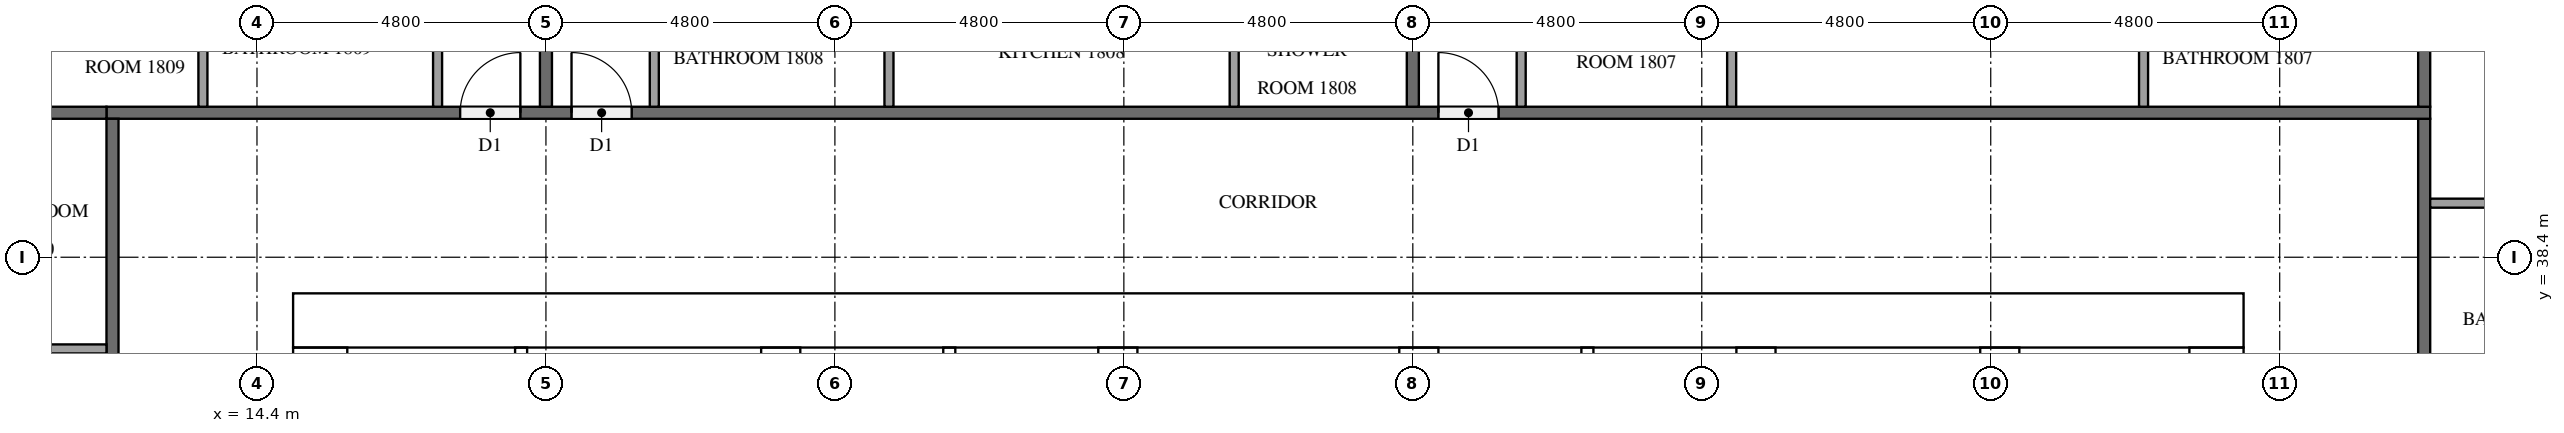
"""IFC4 building model, lengths in metres.
Left out: names, types, materials, properties, quantities, classifications, styles, units other than length and angle.
Written with IfcOpenShell. Run it as: python <this file> out.ifc"""

import sys

from ifc_helpers import new_model, si_unit, direction, frame, frame_2d, origin, place, context, subcontext, project, spatial, rectangle, extrude, element, fill, save


model = new_model("IFC4")
c1 = context("Model", 3, precision=1e-05, world=origin(), true_north=direction((0.0, 1.0)))
c2 = subcontext(c1, "Body", "Model", "MODEL_VIEW")
j1 = project(units=[si_unit("LENGTHUNIT", "METRE"), si_unit("PLANEANGLEUNIT", "RADIAN")], contexts=[c1])
p1 = place(None, origin())
s1 = spatial("IfcSite", under=j1, at=p1, CompositionType="ELEMENT")
p2 = place(p1, origin())
s2 = spatial("IfcBuilding", under=s1, at=p2, CompositionType="ELEMENT")
p3 = place(p2, frame((0.0, 0.0, 73.3)))
s3 = spatial("IfcBuildingStorey", under=s2, at=p3, CompositionType="ELEMENT", Elevation=73.3)
p4 = place(p3, frame((15.0, 37.35, 0.0), z_axis=(0.0, 0.0, 1.0), x_axis=(1.0, 0.0, 0.0)))
e1 = element("IfcWall", 1, at=p4, inside=s3, PredefinedType="SHEAR", context=c2, shape_type="SweptSolid", body=[
    extrude(rectangle(XDim=32.4, YDim=0.9, at=frame_2d((16.2, 0.0))), origin(), (0.0, 0.0, 1.0), 3.2),
])
p5 = place(p4, frame((15.3, 0.0, 0.0)))
e2 = element("IfcOpeningElement", 2, at=p5, cuts=e1, PredefinedType="OPENING", context=c2, shape_type="SweptSolid", body=[
    extrude(rectangle(XDim=1.8, YDim=2.1, at=frame_2d((0.9, 1.05))), frame((0.0, 0.46, 0.0), z_axis=(0.0, -1.0, 0.0), x_axis=(1.0, 0.0, 0.0)), (0.0, 0.0, 1.0), 0.92),
])
p6 = place(p4, frame((1.794, 0.0, 0.0)))
e3 = element("IfcOpeningElement", 3, at=p6, cuts=e1, PredefinedType="OPENING", context=c2, shape_type="SweptSolid", body=[
    extrude(rectangle(XDim=1.0, YDim=2.1, at=frame_2d((0.5, 1.05))), frame((0.0, 0.46, 0.0), z_axis=(0.0, -1.0, 0.0), x_axis=(1.0, 0.0, 0.0)), (0.0, 0.0, 1.0), 0.92),
])
p7 = place(p4, frame((5.331, 0.0, 0.0)))
e4 = element("IfcOpeningElement", 4, at=p7, cuts=e1, PredefinedType="OPENING", context=c2, shape_type="SweptSolid", body=[
    extrude(rectangle(XDim=1.0, YDim=2.1, at=frame_2d((0.5, 1.05))), frame((0.0, 0.46, 0.0), z_axis=(0.0, -1.0, 0.0), x_axis=(1.0, 0.0, 0.0)), (0.0, 0.0, 1.0), 0.92),
])
p8 = place(p3, frame((15.45, 15.9, 0.0), z_axis=(0.0, 0.0, 1.0), x_axis=(0.0, 1.0, 0.0)))
e5 = element("IfcWall", 5, at=p8, inside=s3, PredefinedType="SHEAR", context=c2, shape_type="SweptSolid", body=[
    extrude(rectangle(XDim=21.0, YDim=0.9, at=frame_2d((10.5, 0.0))), origin(), (0.0, 0.0, 1.0), 3.2),
])
p9 = place(p8, frame((4.86, 0.0, 0.0)))
e6 = element("IfcOpeningElement", 6, at=p9, cuts=e5, PredefinedType="OPENING", context=c2, shape_type="SweptSolid", body=[
    extrude(rectangle(XDim=1.2, YDim=2.1, at=frame_2d((0.6, 1.05))), frame((0.0, 0.46, 0.0), z_axis=(0.0, -1.0, 0.0), x_axis=(1.0, 0.0, 0.0)), (0.0, 0.0, 1.0), 0.92),
])
p10 = place(p3, frame((46.95, 15.9, 0.0), z_axis=(0.0, 0.0, 1.0), x_axis=(0.0, 1.0, 0.0)))
e7 = element("IfcWall", 7, at=p10, inside=s3, PredefinedType="SHEAR", context=c2, shape_type="SweptSolid", body=[
    extrude(rectangle(XDim=21.0, YDim=0.9, at=frame_2d((10.5, 0.0))), origin(), (0.0, 0.0, 1.0), 3.2),
])
p11 = place(p10, frame((10.2, 0.0, 0.0)))
e8 = element("IfcOpeningElement", 8, at=p11, cuts=e7, PredefinedType="OPENING", context=c2, shape_type="SweptSolid", body=[
    extrude(rectangle(XDim=1.2, YDim=2.1, at=frame_2d((0.6, 1.05))), frame((0.0, 0.46, 0.0), z_axis=(0.0, -1.0, 0.0), x_axis=(1.0, 0.0, 0.0)), (0.0, 0.0, 1.0), 0.92),
])
p12 = place(p3, frame((23.1, 15.9, 0.0), z_axis=(0.0, 0.0, 1.0), x_axis=(0.0, 1.0, 0.0)))
e9 = element("IfcWall", 9, at=p12, inside=s3, PredefinedType="SHEAR", context=c2, shape_type="SweptSolid", body=[
    extrude(rectangle(XDim=21.0, YDim=0.65, at=frame_2d((10.5, 0.0))), origin(), (0.0, 0.0, 1.0), 3.2),
])
p13 = place(p3, frame((39.3, 27.75, 0.0), z_axis=(0.0, 0.0, 1.0), x_axis=(0.0, 1.0, 0.0)))
e10 = element("IfcWall", 10, at=p13, inside=s3, PredefinedType="SHEAR", context=c2, shape_type="SweptSolid", body=[
    extrude(rectangle(XDim=9.15, YDim=0.65, at=frame_2d((4.575, 0.0))), origin(), (0.0, 0.0, 1.0), 3.2),
])
p14 = place(p3, frame((43.35, 27.75, 0.0), z_axis=(0.0, 0.0, 1.0), x_axis=(0.0, 1.0, 0.0)))
e11 = element("IfcWall", 11, at=p14, inside=s3, PredefinedType="SHEAR", context=c2, shape_type="SweptSolid", body=[
    extrude(rectangle(XDim=9.15, YDim=0.65, at=frame_2d((4.575, 0.0))), origin(), (0.0, 0.0, 1.0), 3.2),
])
p15 = place(p14, frame((7.65, 0.0, 0.0)))
e12 = element("IfcOpeningElement", 12, at=p15, cuts=e11, PredefinedType="OPENING", context=c2, shape_type="SweptSolid", body=[
    extrude(rectangle(XDim=1.2, YDim=2.1, at=frame_2d((0.6, 1.05))), frame((0.0, 0.335, 0.0), z_axis=(0.0, -1.0, 0.0), x_axis=(1.0, 0.0, 0.0)), (0.0, 0.0, 1.0), 0.67),
])
for number, where, z_axis, x_axis in (
    (13, (28.7, 33.875, 0.0), (0.0, 0.0, 1.0), (0.0, 1.0, 0.0)),
    (14, (33.7, 33.875, 0.0), (0.0, 0.0, 1.0), (0.0, 1.0, 0.0)),
):
    element("IfcWall", number, at=place(p3, frame(where, z_axis=z_axis, x_axis=x_axis)), inside=s3, PredefinedType="SHEAR", context=c2, shape_type="SweptSolid", body=[
        extrude(rectangle(XDim=3.025, YDim=0.65, at=frame_2d((1.512, 0.0))), origin(), (0.0, 0.0, 1.0), 3.2),
    ])
for number, where, z_axis, x_axis in (
    (15, (25.9, 33.875, 0.0), (0.0, 0.0, 1.0), (0.0, 1.0, 0.0)),
    (16, (36.5, 33.875, 0.0), (0.0, 0.0, 1.0), (0.0, 1.0, 0.0)),
):
    element("IfcWall", number, at=place(p3, frame(where, z_axis=z_axis, x_axis=x_axis)), inside=s3, PredefinedType="SOLIDWALL", context=c2, shape_type="SweptSolid", body=[
        extrude(rectangle(XDim=3.025, YDim=0.2, at=frame_2d((1.512, 0.0))), origin(), (0.0, 0.0, 1.0), 3.2),
    ])
p16 = place(p3, frame((18.788, 31.575, 0.0), z_axis=(0.0, 0.0, 1.0), x_axis=(0.0, 1.0, 0.0)))
e17 = element("IfcWall", 17, at=p16, inside=s3, PredefinedType="PARTITIONING", context=c2, shape_type="SweptSolid", body=[
    extrude(rectangle(XDim=5.325, YDim=0.2, at=frame_2d((2.663, 0.0))), origin(), (0.0, 0.0, 1.0), 3.2),
])
p17 = place(p3, frame((50.4, 40.7, 0.0), z_axis=(0.0, 0.0, 1.0), x_axis=(0.0, -1.0, 0.0)))
e18 = element("IfcWall", 18, at=p17, inside=s3, PredefinedType="PARTITIONING", context=c2, shape_type="SweptSolid", body=[
    extrude(rectangle(XDim=28.6, YDim=0.2, at=frame_2d((14.3, 0.0))), origin(), (0.0, 0.0, 1.0), 3.2),
])
p18 = place(p17, frame((21.875, 0.0, 0.0)))
e19 = element("IfcOpeningElement", 19, at=p18, cuts=e18, PredefinedType="OPENING", context=c2, shape_type="SweptSolid", body=[
    extrude(rectangle(XDim=1.1, YDim=2.1, at=frame_2d((0.55, 1.05))), frame((0.0, 0.11, 0.0), z_axis=(0.0, -1.0, 0.0), x_axis=(1.0, 0.0, 0.0)), (0.0, 0.0, 1.0), 0.22),
])
p19 = place(p17, frame((20.075, 0.0, 0.0)))
e20 = element("IfcOpeningElement", 20, at=p19, cuts=e18, PredefinedType="OPENING", context=c2, shape_type="SweptSolid", body=[
    extrude(rectangle(XDim=1.0, YDim=2.1, at=frame_2d((0.5, 1.05))), frame((0.0, 0.11, 0.0), z_axis=(0.0, -1.0, 0.0), x_axis=(1.0, 0.0, 0.0)), (0.0, 0.0, 1.0), 0.22),
])
p20 = place(p17, frame((5.675, 0.0, 0.0)))
e21 = element("IfcOpeningElement", 21, at=p20, cuts=e18, PredefinedType="OPENING", context=c2, shape_type="SweptSolid", body=[
    extrude(rectangle(XDim=1.0, YDim=2.1, at=frame_2d((0.5, 1.05))), frame((0.0, 0.11, 0.0), z_axis=(0.0, -1.0, 0.0), x_axis=(1.0, 0.0, 0.0)), (0.0, 0.0, 1.0), 0.22),
])
p21 = place(p3, frame((11.9, 40.8, 0.0), z_axis=(0.0, 0.0, 1.0), x_axis=(1.0, 0.0, 0.0)))
e22 = element("IfcWall", 22, at=p21, inside=s3, PredefinedType="PARTITIONING", context=c2, shape_type="SweptSolid", body=[
    extrude(rectangle(XDim=38.6, YDim=0.2, at=frame_2d((19.3, 0.0))), origin(), (0.0, 0.0, 1.0), 3.2),
])
p22 = place(p21, frame((22.125, 0.0, 0.0)))
e23 = element("IfcOpeningElement", 23, at=p22, cuts=e22, PredefinedType="OPENING", context=c2, shape_type="SweptSolid", body=[
    extrude(rectangle(XDim=1.0, YDim=2.1, at=frame_2d((0.5, 1.05))), frame((0.0, 0.11, 0.0), z_axis=(0.0, -1.0, 0.0), x_axis=(1.0, 0.0, 0.0)), (0.0, 0.0, 1.0), 0.22),
])
p23 = place(p21, frame((7.725, 0.0, 0.0)))
e24 = element("IfcOpeningElement", 24, at=p23, cuts=e22, PredefinedType="OPENING", context=c2, shape_type="SweptSolid", body=[
    extrude(rectangle(XDim=1.0, YDim=2.1, at=frame_2d((0.5, 1.05))), frame((0.0, 0.11, 0.0), z_axis=(0.0, -1.0, 0.0), x_axis=(1.0, 0.0, 0.0)), (0.0, 0.0, 1.0), 0.22),
])
p24 = place(p21, frame((5.875, 0.0, 0.0)))
e25 = element("IfcOpeningElement", 25, at=p24, cuts=e22, PredefinedType="OPENING", context=c2, shape_type="SweptSolid", body=[
    extrude(rectangle(XDim=1.0, YDim=2.1, at=frame_2d((0.5, 1.05))), frame((0.0, 0.11, 0.0), z_axis=(0.0, -1.0, 0.0), x_axis=(1.0, 0.0, 0.0)), (0.0, 0.0, 1.0), 0.22),
])
p25 = place(p3, frame((12.0, 12.1, 0.0), z_axis=(0.0, 0.0, 1.0), x_axis=(0.0, 1.0, 0.0)))
e26 = element("IfcWall", 26, at=p25, inside=s3, PredefinedType="PARTITIONING", context=c2, shape_type="SweptSolid", body=[
    extrude(rectangle(XDim=28.6, YDim=0.2, at=frame_2d((14.3, 0.0))), origin(), (0.0, 0.0, 1.0), 3.2),
])
p26 = place(p25, frame((14.725, 0.0, 0.0)))
e27 = element("IfcOpeningElement", 27, at=p26, cuts=e26, PredefinedType="OPENING", context=c2, shape_type="SweptSolid", body=[
    extrude(rectangle(XDim=1.0, YDim=2.1, at=frame_2d((0.5, 1.05))), frame((0.0, 0.11, 0.0), z_axis=(0.0, -1.0, 0.0), x_axis=(1.0, 0.0, 0.0)), (0.0, 0.0, 1.0), 0.22),
])
p27 = place(p25, frame((12.875, 0.0, 0.0)))
e28 = element("IfcOpeningElement", 28, at=p27, cuts=e26, PredefinedType="OPENING", context=c2, shape_type="SweptSolid", body=[
    extrude(rectangle(XDim=1.0, YDim=2.1, at=frame_2d((0.5, 1.05))), frame((0.0, 0.11, 0.0), z_axis=(0.0, -1.0, 0.0), x_axis=(1.0, 0.0, 0.0)), (0.0, 0.0, 1.0), 0.22),
])
p28 = place(p25, frame((0.875, 0.0, 0.0)))
e29 = element("IfcOpeningElement", 29, at=p28, cuts=e26, PredefinedType="OPENING", context=c2, shape_type="SweptSolid", body=[
    extrude(rectangle(XDim=1.0, YDim=2.1, at=frame_2d((0.5, 1.05))), frame((0.0, 0.11, 0.0), z_axis=(0.0, -1.0, 0.0), x_axis=(1.0, 0.0, 0.0)), (0.0, 0.0, 1.0), 0.22),
])
for number, where, z_axis, x_axis in (
    (30, (50.4, 40.9, 0.0), (0.0, 0.0, 1.0), (0.0, 1.0, 0.0)),
    (31, (33.6, 47.9, 0.0), (0.0, 0.0, 1.0), (0.0, -1.0, 0.0)),
):
    element("IfcWall", number, at=place(p3, frame(where, z_axis=z_axis, x_axis=x_axis)), inside=s3, PredefinedType="PARTITIONING", context=c2, shape_type="SweptSolid", body=[
        extrude(rectangle(XDim=7.0, YDim=0.2, at=frame_2d((3.5, 0.0))), origin(), (0.0, 0.0, 1.0), 3.2),
    ])
p29 = place(p3, frame((19.2, 47.575, 0.0), z_axis=(0.0, 0.0, 1.0), x_axis=(0.0, -1.0, 0.0)))
e32 = element("IfcWall", 32, at=p29, inside=s3, PredefinedType="PARTITIONING", context=c2, shape_type="SweptSolid", body=[
    extrude(rectangle(XDim=6.675, YDim=0.2, at=frame_2d((3.337, 0.0))), origin(), (0.0, 0.0, 1.0), 3.2),
])
p30 = place(p3, frame((4.9, 40.8, 0.0), z_axis=(0.0, 0.0, 1.0), x_axis=(1.0, 0.0, 0.0)))
e33 = element("IfcWall", 33, at=p30, inside=s3, PredefinedType="PARTITIONING", context=c2, shape_type="SweptSolid", body=[
    extrude(rectangle(XDim=7.0, YDim=0.2, at=frame_2d((3.5, 0.0))), origin(), (0.0, 0.0, 1.0), 3.2),
])
p31 = place(p3, frame((50.5, 39.298, 0.0), z_axis=(0.0, 0.0, 1.0), x_axis=(1.0, 0.0, 0.0)))
e34 = element("IfcWall", 34, at=p31, inside=s3, PredefinedType="PARTITIONING", context=c2, shape_type="SweptSolid", body=[
    extrude(rectangle(XDim=3.575, YDim=0.15, at=frame_2d((1.788, 0.0))), origin(), (0.0, 0.0, 1.0), 3.2),
])
for number, where, z_axis, x_axis in (
    (35, (38.896, 40.9, 0.0), (0.0, 0.0, 1.0), (0.0, 1.0, 0.0)),
    (36, (45.739, 40.9, 0.0), (0.0, 0.0, 1.0), (0.0, 1.0, 0.0)),
):
    element("IfcWall", number, at=place(p3, frame(where, z_axis=z_axis, x_axis=x_axis)), inside=s3, PredefinedType="PARTITIONING", context=c2, shape_type="SweptSolid", body=[
        extrude(rectangle(XDim=2.075, YDim=0.15, at=frame_2d((1.038, 0.0))), origin(), (0.0, 0.0, 1.0), 3.2),
    ])
p32 = place(p3, frame((35.4, 40.9, 0.0), z_axis=(0.0, 0.0, 1.0), x_axis=(0.0, 1.0, 0.0)))
e37 = element("IfcWall", 37, at=p32, inside=s3, PredefinedType="PARTITIONING", context=c2, shape_type="SweptSolid", body=[
    extrude(rectangle(XDim=2.225, YDim=0.15, at=frame_2d((1.113, 0.0))), origin(), (0.0, 0.0, 1.0), 3.2),
])
for number, where, z_axis, x_axis in (
    (38, (24.898, 40.9, 0.0), (0.0, 0.0, 1.0), (0.0, 1.0, 0.0)),
    (39, (30.633, 40.9, 0.0), (0.0, 0.0, 1.0), (0.0, 1.0, 0.0)),
):
    element("IfcWall", number, at=place(p3, frame(where, z_axis=z_axis, x_axis=x_axis)), inside=s3, PredefinedType="PARTITIONING", context=c2, shape_type="SweptSolid", body=[
        extrude(rectangle(XDim=1.775, YDim=0.15, at=frame_2d((0.888, 0.0))), origin(), (0.0, 0.0, 1.0), 3.2),
    ])
p33 = place(p3, frame((21.0, 40.9, 0.0), z_axis=(0.0, 0.0, 1.0), x_axis=(0.0, 1.0, 0.0)))
e40 = element("IfcWall", 40, at=p33, inside=s3, PredefinedType="PARTITIONING", context=c2, shape_type="SweptSolid", body=[
    extrude(rectangle(XDim=1.925, YDim=0.15, at=frame_2d((0.962, 0.0))), origin(), (0.0, 0.0, 1.0), 3.2),
])
p34 = place(p3, frame((13.502, 40.9, 0.0), z_axis=(0.0, 0.0, 1.0), x_axis=(0.0, 1.0, 0.0)))
e41 = element("IfcWall", 41, at=p34, inside=s3, PredefinedType="PARTITIONING", context=c2, shape_type="SweptSolid", body=[
    extrude(rectangle(XDim=2.075, YDim=0.15, at=frame_2d((1.038, 0.0))), origin(), (0.0, 0.0, 1.0), 3.2),
])
p35 = place(p3, frame((17.4, 40.9, 0.0), z_axis=(0.0, 0.0, 1.0), x_axis=(0.0, 1.0, 0.0)))
e42 = element("IfcWall", 42, at=p35, inside=s3, PredefinedType="PARTITIONING", context=c2, shape_type="SweptSolid", body=[
    extrude(rectangle(XDim=2.225, YDim=0.15, at=frame_2d((1.113, 0.0))), origin(), (0.0, 0.0, 1.0), 3.2),
])
p36 = place(p3, frame((11.9, 36.877, 0.0), z_axis=(0.0, 0.0, 1.0), x_axis=(-1.0, 0.0, 0.0)))
e43 = element("IfcWall", 43, at=p36, inside=s3, PredefinedType="PARTITIONING", context=c2, shape_type="SweptSolid", body=[
    extrude(rectangle(XDim=2.375, YDim=0.15, at=frame_2d((1.188, 0.0))), origin(), (0.0, 0.0, 1.0), 3.2),
])
p37 = place(p5, origin())
e44 = element("IfcDoor", 44, at=p37, inside=s3, OperationType="DOUBLE_DOOR_SINGLE_SWING", PredefinedType="DOOR", context=c2, shape_type="SweptSolid", body=[
    extrude(rectangle(XDim=1.8, YDim=2.1, at=frame_2d((0.9, 1.05))), frame((0.0, 0.025, 0.0), z_axis=(0.0, -1.0, 0.0), x_axis=(1.0, 0.0, 0.0)), (0.0, 0.0, 1.0), 0.05),
])
fill(e2, e44)
p38 = place(p6, origin())
e45 = element("IfcDoor", 45, at=p38, inside=s3, OperationType="SINGLE_SWING_LEFT", PredefinedType="DOOR", context=c2, shape_type="SweptSolid", body=[
    extrude(rectangle(XDim=1.0, YDim=2.1, at=frame_2d((0.5, 1.05))), frame((0.0, 0.025, 0.0), z_axis=(0.0, -1.0, 0.0), x_axis=(1.0, 0.0, 0.0)), (0.0, 0.0, 1.0), 0.05),
])
fill(e3, e45)
p39 = place(p7, origin())
e46 = element("IfcDoor", 46, at=p39, inside=s3, OperationType="SINGLE_SWING_RIGHT", PredefinedType="DOOR", context=c2, shape_type="SweptSolid", body=[
    extrude(rectangle(XDim=1.0, YDim=2.1, at=frame_2d((0.5, 1.05))), frame((0.0, 0.025, 0.0), z_axis=(0.0, -1.0, 0.0), x_axis=(1.0, 0.0, 0.0)), (0.0, 0.0, 1.0), 0.05),
])
fill(e4, e46)
p40 = place(p22, origin())
e47 = element("IfcDoor", 47, at=p40, inside=s3, OperationType="SINGLE_SWING_LEFT", PredefinedType="DOOR", context=c2, shape_type="SweptSolid", body=[
    extrude(rectangle(XDim=1.0, YDim=2.1, at=frame_2d((0.5, 1.05))), frame((0.0, 0.025, 0.0), z_axis=(0.0, -1.0, 0.0), x_axis=(1.0, 0.0, 0.0)), (0.0, 0.0, 1.0), 0.05),
])
fill(e23, e47)
p41 = place(p23, origin())
e48 = element("IfcDoor", 48, at=p41, inside=s3, OperationType="SINGLE_SWING_LEFT", PredefinedType="DOOR", context=c2, shape_type="SweptSolid", body=[
    extrude(rectangle(XDim=1.0, YDim=2.1, at=frame_2d((0.5, 1.05))), frame((0.0, 0.025, 0.0), z_axis=(0.0, -1.0, 0.0), x_axis=(1.0, 0.0, 0.0)), (0.0, 0.0, 1.0), 0.05),
])
fill(e24, e48)
p42 = place(p24, origin())
e49 = element("IfcDoor", 49, at=p42, inside=s3, OperationType="SINGLE_SWING_RIGHT", PredefinedType="DOOR", context=c2, shape_type="SweptSolid", body=[
    extrude(rectangle(XDim=1.0, YDim=2.1, at=frame_2d((0.5, 1.05))), frame((0.0, 0.025, 0.0), z_axis=(0.0, -1.0, 0.0), x_axis=(1.0, 0.0, 0.0)), (0.0, 0.0, 1.0), 0.05),
])
fill(e25, e49)
save(model, sys.argv[1])
